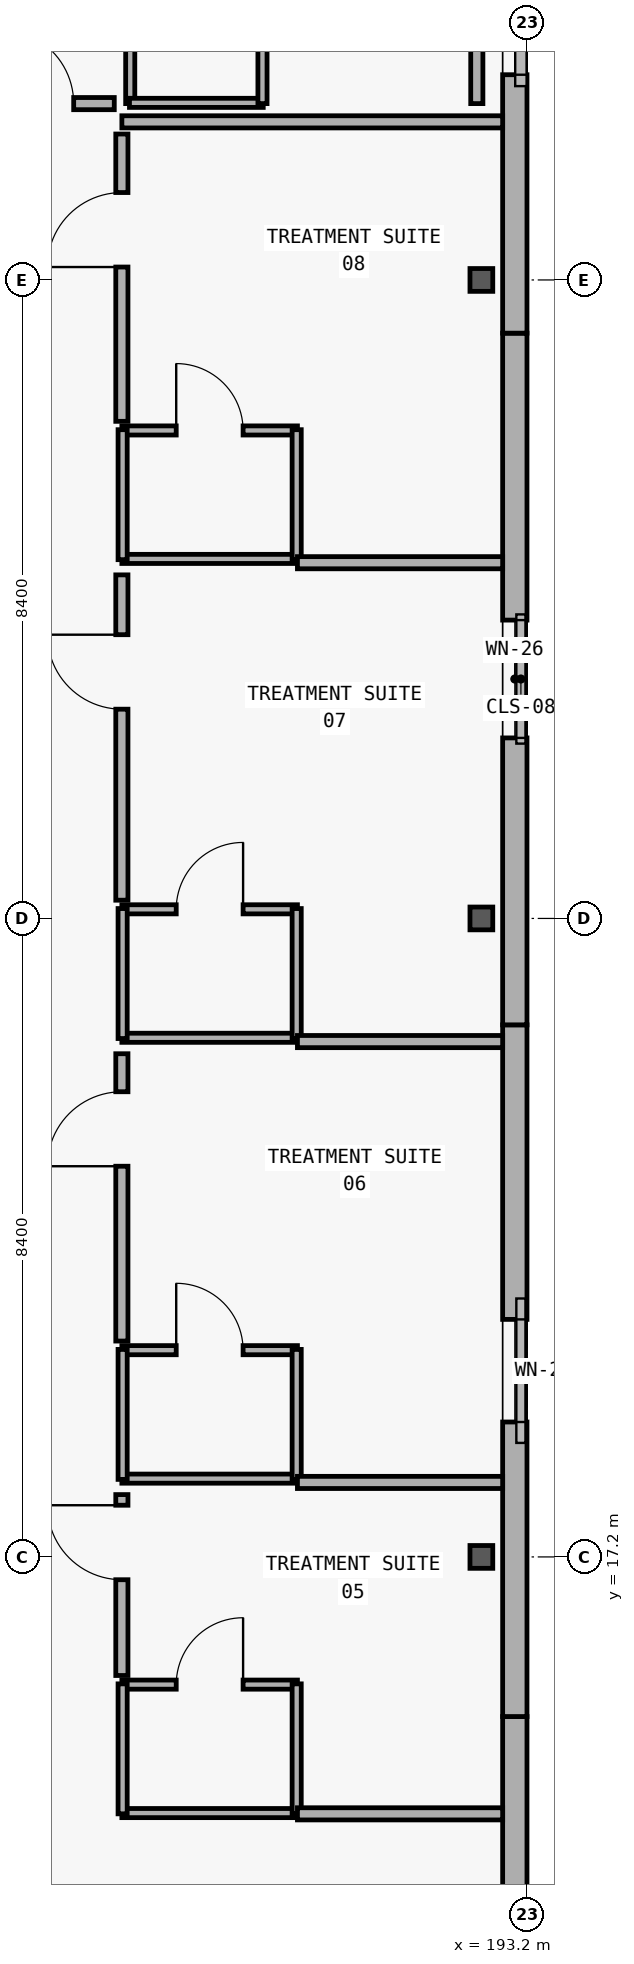
"""IFC4 building model, lengths in metres.
Left out: names, types, materials, properties, quantities, classifications, styles, units other than length and angle.
Written with IfcOpenShell. Run it as: python <this file> out.ifc"""

import sys

from ifc_helpers import new_model, si_unit, direction, frame, frame_2d, origin, origin_2d, place, context, subcontext, project, spatial, rectangle, i_section, extrude, element, fill, save


model = new_model("IFC4")
c1 = context("Model", 3, precision=1e-05, world=origin(), true_north=direction((0.0, 1.0)))
c2 = subcontext(c1, "Body", "Model", "MODEL_VIEW")
j1 = project(units=[si_unit("LENGTHUNIT", "METRE"), si_unit("PLANEANGLEUNIT", "RADIAN")], contexts=[c1])
p1 = place(None, origin())
s1 = spatial("IfcSite", under=j1, at=p1, CompositionType="ELEMENT")
p2 = place(p1, origin())
s2 = spatial("IfcBuilding", under=s1, at=p2, CompositionType="ELEMENT")
p3 = place(p2, frame((0.0, 0.0, 5.4)))
s3 = spatial("IfcBuildingStorey", under=s2, at=p3, CompositionType="ELEMENT", Elevation=5.4)
for number, where, z_axis, x_axis in (
    (1, (192.6, 17.2, 0.0), (0.0, 0.0, 1.0), (1.0, 0.0, 0.0)),
    (2, (192.6, 25.6, 0.0), (0.0, 0.0, 1.0), (1.0, 0.0, 0.0)),
    (3, (192.6, 34.0, 0.0), (0.0, 0.0, 1.0), (1.0, 0.0, 0.0)),
):
    element("IfcColumn", number, at=place(p3, frame(where, z_axis=z_axis, x_axis=x_axis)), inside=s3, PredefinedType="COLUMN", context=c2, shape_type="SweptSolid", body=[
        extrude(i_section(OverallWidth=0.3, OverallDepth=0.3, WebThickness=0.011, FlangeThickness=0.019, at=origin_2d()), origin(), (0.0, 0.0, 1.0), 5.4),
    ])
p4 = place(p3, frame((193.04, 15.1, 0.0), z_axis=(0.0, 0.0, 1.0), x_axis=(0.0, -1.0, 0.0)))
e4 = element("IfcWall", 4, at=p4, inside=s3, PredefinedType="SOLIDWALL", context=c2, shape_type="SweptSolid", body=[
    extrude(rectangle(XDim=9.1, YDim=0.32, at=frame_2d((4.55, 0.0))), origin(), (0.0, 0.0, 1.0), 5.1),
])
p5 = place(p4, frame((2.55, 0.0, 0.9)))
e5 = element("IfcOpeningElement", 5, at=p5, cuts=e4, PredefinedType="OPENING", context=c2, shape_type="SweptSolid", body=[
    extrude(rectangle(XDim=4.0, YDim=2.4, at=frame_2d((2.0, 1.2))), frame((0.0, 0.17, 0.0), z_axis=(0.0, -1.0, 0.0), x_axis=(1.0, 0.0, 0.0)), (0.0, 0.0, 1.0), 0.34),
])
p6 = place(p3, frame((193.04, 24.2, 0.0), z_axis=(0.0, 0.0, 1.0), x_axis=(0.0, -1.0, 0.0)))
e6 = element("IfcWall", 6, at=p6, inside=s3, PredefinedType="SOLIDWALL", context=c2, shape_type="SweptSolid", body=[
    extrude(rectangle(XDim=9.1, YDim=0.32, at=frame_2d((4.55, 0.0))), origin(), (0.0, 0.0, 1.0), 5.1),
])
p7 = place(p6, frame((3.875, 0.0, 0.9)))
e7 = element("IfcOpeningElement", 7, at=p7, cuts=e6, PredefinedType="OPENING", context=c2, shape_type="SweptSolid", body=[
    extrude(rectangle(XDim=1.35, YDim=1.55, at=frame_2d((0.675, 0.775))), frame((0.0, 0.17, 0.0), z_axis=(0.0, -1.0, 0.0), x_axis=(1.0, 0.0, 0.0)), (0.0, 0.0, 1.0), 0.34),
])
p8 = place(p3, frame((193.04, 33.3, 0.0), z_axis=(0.0, 0.0, 1.0), x_axis=(0.0, -1.0, 0.0)))
e8 = element("IfcWall", 8, at=p8, inside=s3, PredefinedType="SOLIDWALL", context=c2, shape_type="SweptSolid", body=[
    extrude(rectangle(XDim=9.1, YDim=0.32, at=frame_2d((4.55, 0.0))), origin(), (0.0, 0.0, 1.0), 5.1),
])
p9 = place(p8, frame((3.775, 0.0, 0.9)))
e9 = element("IfcOpeningElement", 9, at=p9, cuts=e8, PredefinedType="OPENING", context=c2, shape_type="SweptSolid", body=[
    extrude(rectangle(XDim=1.55, YDim=1.65, at=frame_2d((0.775, 0.825))), frame((0.0, 0.17, 0.0), z_axis=(0.0, -1.0, 0.0), x_axis=(1.0, 0.0, 0.0)), (0.0, 0.0, 1.0), 0.34),
])
p10 = place(p3, frame((193.04, 42.4, 0.0), z_axis=(0.0, 0.0, 1.0), x_axis=(0.0, -1.0, 0.0)))
e10 = element("IfcWall", 10, at=p10, inside=s3, PredefinedType="SOLIDWALL", context=c2, shape_type="SweptSolid", body=[
    extrude(rectangle(XDim=9.1, YDim=0.32, at=frame_2d((4.55, 0.0))), origin(), (0.0, 0.0, 1.0), 5.1),
])
p11 = place(p10, frame((3.4, 0.0, 0.9)))
e11 = element("IfcOpeningElement", 11, at=p11, cuts=e10, PredefinedType="OPENING", context=c2, shape_type="SweptSolid", body=[
    extrude(rectangle(XDim=2.3, YDim=2.05, at=frame_2d((1.15, 1.025))), frame((0.0, 0.17, 0.0), z_axis=(0.0, -1.0, 0.0), x_axis=(1.0, 0.0, 0.0)), (0.0, 0.0, 1.0), 0.34),
])
p12 = place(p3, frame((187.87, 15.52, 0.0), z_axis=(0.0, 0.0, 1.0), x_axis=(1.0, 0.0, 0.0)))
e12 = element("IfcWall", 12, at=p12, inside=s3, PredefinedType="PARTITIONING", context=c2, shape_type="SweptSolid", body=[
    extrude(rectangle(XDim=2.31, YDim=0.12, at=frame_2d((1.155, 0.0))), origin(), (0.0, 0.0, 1.0), 4.18),
])
p13 = place(p12, frame((0.715, 0.0, 0.0)))
e13 = element("IfcOpeningElement", 13, at=p13, cuts=e12, PredefinedType="OPENING", context=c2, shape_type="SweptSolid", body=[
    extrude(rectangle(XDim=0.88, YDim=2.15, at=frame_2d((0.44, 1.075))), frame((0.0, 0.07, 0.0), z_axis=(0.0, -1.0, 0.0), x_axis=(1.0, 0.0, 0.0)), (0.0, 0.0, 1.0), 0.14),
])
p14 = place(p3, frame((187.87, 19.92, 0.0), z_axis=(0.0, 0.0, 1.0), x_axis=(1.0, 0.0, 0.0)))
e14 = element("IfcWall", 14, at=p14, inside=s3, PredefinedType="PARTITIONING", context=c2, shape_type="SweptSolid", body=[
    extrude(rectangle(XDim=2.31, YDim=0.12, at=frame_2d((1.155, 0.0))), origin(), (0.0, 0.0, 1.0), 4.18),
])
p15 = place(p14, frame((0.715, 0.0, 0.0)))
e15 = element("IfcOpeningElement", 15, at=p15, cuts=e14, PredefinedType="OPENING", context=c2, shape_type="SweptSolid", body=[
    extrude(rectangle(XDim=0.88, YDim=2.15, at=frame_2d((0.44, 1.075))), frame((0.0, 0.07, 0.0), z_axis=(0.0, -1.0, 0.0), x_axis=(1.0, 0.0, 0.0)), (0.0, 0.0, 1.0), 0.14),
])
p16 = place(p3, frame((187.87, 25.72, 0.0), z_axis=(0.0, 0.0, 1.0), x_axis=(1.0, 0.0, 0.0)))
e16 = element("IfcWall", 16, at=p16, inside=s3, PredefinedType="PARTITIONING", context=c2, shape_type="SweptSolid", body=[
    extrude(rectangle(XDim=2.31, YDim=0.12, at=frame_2d((1.155, 0.0))), origin(), (0.0, 0.0, 1.0), 4.18),
])
p17 = place(p16, frame((0.715, 0.0, 0.0)))
e17 = element("IfcOpeningElement", 17, at=p17, cuts=e16, PredefinedType="OPENING", context=c2, shape_type="SweptSolid", body=[
    extrude(rectangle(XDim=0.88, YDim=2.15, at=frame_2d((0.44, 1.075))), frame((0.0, 0.07, 0.0), z_axis=(0.0, -1.0, 0.0), x_axis=(1.0, 0.0, 0.0)), (0.0, 0.0, 1.0), 0.14),
])
p18 = place(p3, frame((187.87, 32.02, 0.0), z_axis=(0.0, 0.0, 1.0), x_axis=(1.0, 0.0, 0.0)))
e18 = element("IfcWall", 18, at=p18, inside=s3, PredefinedType="PARTITIONING", context=c2, shape_type="SweptSolid", body=[
    extrude(rectangle(XDim=2.31, YDim=0.12, at=frame_2d((1.155, 0.0))), origin(), (0.0, 0.0, 1.0), 4.18),
])
p19 = place(p18, frame((0.715, 0.0, 0.0)))
e19 = element("IfcOpeningElement", 19, at=p19, cuts=e18, PredefinedType="OPENING", context=c2, shape_type="SweptSolid", body=[
    extrude(rectangle(XDim=0.88, YDim=2.15, at=frame_2d((0.44, 1.075))), frame((0.0, 0.07, 0.0), z_axis=(0.0, -1.0, 0.0), x_axis=(1.0, 0.0, 0.0)), (0.0, 0.0, 1.0), 0.14),
])
p20 = place(p3, frame((187.98, 36.32, 0.0), z_axis=(0.0, 0.0, 1.0), x_axis=(0.0, 1.0, 0.0)))
e20 = element("IfcWall", 20, at=p20, inside=s3, PredefinedType="PARTITIONING", context=c2, shape_type="SweptSolid", body=[
    extrude(rectangle(XDim=2.31, YDim=0.12, at=frame_2d((1.155, 0.0))), origin(), (0.0, 0.0, 1.0), 4.18),
])
p21 = place(p20, frame((0.715, 0.0, 0.0)))
e21 = element("IfcOpeningElement", 21, at=p21, cuts=e20, PredefinedType="OPENING", context=c2, shape_type="SweptSolid", body=[
    extrude(rectangle(XDim=0.88, YDim=2.15, at=frame_2d((0.44, 1.075))), frame((0.0, 0.07, 0.0), z_axis=(0.0, -1.0, 0.0), x_axis=(1.0, 0.0, 0.0)), (0.0, 0.0, 1.0), 0.14),
])
p22 = place(p3, frame((187.87, 15.64, 0.0), z_axis=(0.0, 0.0, 1.0), x_axis=(0.0, 1.0, 0.0)))
e22 = element("IfcWall", 22, at=p22, inside=s3, PredefinedType="PARTITIONING", context=c2, shape_type="SweptSolid", body=[
    extrude(rectangle(XDim=2.38, YDim=0.16, at=frame_2d((1.19, 0.0))), origin(), (0.0, 0.0, 1.0), 4.18),
])
p23 = place(p22, frame((1.26, 0.0, 0.0)))
e23 = element("IfcOpeningElement", 23, at=p23, cuts=e22, PredefinedType="OPENING", context=c2, shape_type="SweptSolid", body=[
    extrude(rectangle(XDim=0.98, YDim=2.2, at=frame_2d((0.49, 1.1))), frame((0.0, 0.09, 0.0), z_axis=(0.0, -1.0, 0.0), x_axis=(1.0, 0.0, 0.0)), (0.0, 0.0, 1.0), 0.18),
])
p24 = place(p3, frame((187.87, 20.04, 0.0), z_axis=(0.0, 0.0, 1.0), x_axis=(0.0, 1.0, 0.0)))
e24 = element("IfcWall", 24, at=p24, inside=s3, PredefinedType="PARTITIONING", context=c2, shape_type="SweptSolid", body=[
    extrude(rectangle(XDim=3.78, YDim=0.16, at=frame_2d((1.89, 0.0))), origin(), (0.0, 0.0, 1.0), 4.18),
])
p25 = place(p24, frame((2.3, 0.0, 0.0)))
e25 = element("IfcOpeningElement", 25, at=p25, cuts=e24, PredefinedType="OPENING", context=c2, shape_type="SweptSolid", body=[
    extrude(rectangle(XDim=0.98, YDim=2.2, at=frame_2d((0.49, 1.1))), frame((0.0, 0.09, 0.0), z_axis=(0.0, -1.0, 0.0), x_axis=(1.0, 0.0, 0.0)), (0.0, 0.0, 1.0), 0.18),
])
p26 = place(p3, frame((187.87, 25.84, 0.0), z_axis=(0.0, 0.0, 1.0), x_axis=(0.0, 1.0, 0.0)))
e26 = element("IfcWall", 26, at=p26, inside=s3, PredefinedType="PARTITIONING", context=c2, shape_type="SweptSolid", body=[
    extrude(rectangle(XDim=4.28, YDim=0.16, at=frame_2d((2.14, 0.0))), origin(), (0.0, 0.0, 1.0), 4.18),
])
p27 = place(p26, frame((2.513, 0.0, 0.0)))
e27 = element("IfcOpeningElement", 27, at=p27, cuts=e26, PredefinedType="OPENING", context=c2, shape_type="SweptSolid", body=[
    extrude(rectangle(XDim=0.98, YDim=2.2, at=frame_2d((0.49, 1.1))), frame((0.0, 0.09, 0.0), z_axis=(0.0, -1.0, 0.0), x_axis=(1.0, 0.0, 0.0)), (0.0, 0.0, 1.0), 0.18),
])
p28 = place(p3, frame((187.87, 32.14, 0.0), z_axis=(0.0, 0.0, 1.0), x_axis=(0.0, 1.0, 0.0)))
e28 = element("IfcWall", 28, at=p28, inside=s3, PredefinedType="PARTITIONING", context=c2, shape_type="SweptSolid", body=[
    extrude(rectangle(XDim=3.78, YDim=0.16, at=frame_2d((1.89, 0.0))), origin(), (0.0, 0.0, 1.0), 4.18),
])
p29 = place(p28, frame((2.03, 0.0, 0.0)))
e29 = element("IfcOpeningElement", 29, at=p29, cuts=e28, PredefinedType="OPENING", context=c2, shape_type="SweptSolid", body=[
    extrude(rectangle(XDim=0.98, YDim=2.2, at=frame_2d((0.49, 1.1))), frame((0.0, 0.09, 0.0), z_axis=(0.0, -1.0, 0.0), x_axis=(1.0, 0.0, 0.0)), (0.0, 0.0, 1.0), 0.18),
])
p30 = place(p3, frame((185.93, 36.32, 0.0), z_axis=(0.0, 0.0, 1.0), x_axis=(1.0, 0.0, 0.0)))
e30 = element("IfcWall", 30, at=p30, inside=s3, PredefinedType="PARTITIONING", context=c2, shape_type="SweptSolid", body=[
    extrude(rectangle(XDim=1.84, YDim=0.16, at=frame_2d((0.92, 0.0))), origin(), (0.0, 0.0, 1.0), 4.18),
])
p31 = place(p30, frame((0.326, 0.0, 0.0)))
e31 = element("IfcOpeningElement", 31, at=p31, cuts=e30, PredefinedType="OPENING", context=c2, shape_type="SweptSolid", body=[
    extrude(rectangle(XDim=0.98, YDim=2.2, at=frame_2d((0.49, 1.1))), frame((0.0, 0.09, 0.0), z_axis=(0.0, -1.0, 0.0), x_axis=(1.0, 0.0, 0.0)), (0.0, 0.0, 1.0), 0.18),
])
p32 = place(p3, frame((187.87, 13.83, 0.0), z_axis=(0.0, 0.0, 1.0), x_axis=(1.0, 0.0, 0.0)))
e32 = element("IfcWall", 32, at=p32, inside=s3, PredefinedType="PARTITIONING", context=c2, shape_type="SweptSolid", body=[
    extrude(rectangle(XDim=2.31, YDim=0.12, at=frame_2d((1.155, 0.0))), origin(), (0.0, 0.0, 1.0), 4.18),
])
for number, where, z_axis, x_axis in (
    (33, (187.88, 13.82, 0.0), (0.0, 0.0, 1.0), (0.0, 1.0, 0.0)),
    (34, (190.17, 13.82, 0.0), (0.0, 0.0, 1.0), (0.0, 1.0, 0.0)),
):
    element("IfcWall", number, at=place(p3, frame(where, z_axis=z_axis, x_axis=x_axis)), inside=s3, PredefinedType="PARTITIONING", context=c2, shape_type="SweptSolid", body=[
        extrude(rectangle(XDim=1.71, YDim=0.12, at=frame_2d((0.855, 0.0))), origin(), (0.0, 0.0, 1.0), 4.18),
    ])
p33 = place(p3, frame((187.87, 18.23, 0.0), z_axis=(0.0, 0.0, 1.0), x_axis=(1.0, 0.0, 0.0)))
e35 = element("IfcWall", 35, at=p33, inside=s3, PredefinedType="PARTITIONING", context=c2, shape_type="SweptSolid", body=[
    extrude(rectangle(XDim=2.31, YDim=0.12, at=frame_2d((1.155, 0.0))), origin(), (0.0, 0.0, 1.0), 4.18),
])
for number, where, z_axis, x_axis in (
    (36, (187.88, 18.22, 0.0), (0.0, 0.0, 1.0), (0.0, 1.0, 0.0)),
    (37, (190.17, 18.22, 0.0), (0.0, 0.0, 1.0), (0.0, 1.0, 0.0)),
):
    element("IfcWall", number, at=place(p3, frame(where, z_axis=z_axis, x_axis=x_axis)), inside=s3, PredefinedType="PARTITIONING", context=c2, shape_type="SweptSolid", body=[
        extrude(rectangle(XDim=1.71, YDim=0.12, at=frame_2d((0.855, 0.0))), origin(), (0.0, 0.0, 1.0), 4.18),
    ])
p34 = place(p3, frame((187.87, 24.03, 0.0), z_axis=(0.0, 0.0, 1.0), x_axis=(1.0, 0.0, 0.0)))
e38 = element("IfcWall", 38, at=p34, inside=s3, PredefinedType="PARTITIONING", context=c2, shape_type="SweptSolid", body=[
    extrude(rectangle(XDim=2.31, YDim=0.12, at=frame_2d((1.155, 0.0))), origin(), (0.0, 0.0, 1.0), 4.18),
])
for number, where, z_axis, x_axis in (
    (39, (187.88, 24.02, 0.0), (0.0, 0.0, 1.0), (0.0, 1.0, 0.0)),
    (40, (190.17, 24.02, 0.0), (0.0, 0.0, 1.0), (0.0, 1.0, 0.0)),
):
    element("IfcWall", number, at=place(p3, frame(where, z_axis=z_axis, x_axis=x_axis)), inside=s3, PredefinedType="PARTITIONING", context=c2, shape_type="SweptSolid", body=[
        extrude(rectangle(XDim=1.71, YDim=0.12, at=frame_2d((0.855, 0.0))), origin(), (0.0, 0.0, 1.0), 4.18),
    ])
p35 = place(p3, frame((187.87, 30.33, 0.0), z_axis=(0.0, 0.0, 1.0), x_axis=(1.0, 0.0, 0.0)))
e41 = element("IfcWall", 41, at=p35, inside=s3, PredefinedType="PARTITIONING", context=c2, shape_type="SweptSolid", body=[
    extrude(rectangle(XDim=2.31, YDim=0.12, at=frame_2d((1.155, 0.0))), origin(), (0.0, 0.0, 1.0), 4.18),
])
for number, where, z_axis, x_axis in (
    (42, (187.88, 30.32, 0.0), (0.0, 0.0, 1.0), (0.0, 1.0, 0.0)),
    (43, (190.17, 30.32, 0.0), (0.0, 0.0, 1.0), (0.0, 1.0, 0.0)),
):
    element("IfcWall", number, at=place(p3, frame(where, z_axis=z_axis, x_axis=x_axis)), inside=s3, PredefinedType="PARTITIONING", context=c2, shape_type="SweptSolid", body=[
        extrude(rectangle(XDim=1.71, YDim=0.12, at=frame_2d((0.855, 0.0))), origin(), (0.0, 0.0, 1.0), 4.18),
    ])
p36 = place(p3, frame((187.97, 36.33, 0.0), z_axis=(0.0, 0.0, 1.0), x_axis=(1.0, 0.0, 0.0)))
e44 = element("IfcWall", 44, at=p36, inside=s3, PredefinedType="PARTITIONING", context=c2, shape_type="SweptSolid", body=[
    extrude(rectangle(XDim=1.76, YDim=0.12, at=frame_2d((0.88, 0.0))), origin(), (0.0, 0.0, 1.0), 4.18),
])
p37 = place(p3, frame((189.72, 36.32, 0.0), z_axis=(0.0, 0.0, 1.0), x_axis=(0.0, 1.0, 0.0)))
e45 = element("IfcWall", 45, at=p37, inside=s3, PredefinedType="PARTITIONING", context=c2, shape_type="SweptSolid", body=[
    extrude(rectangle(XDim=2.31, YDim=0.12, at=frame_2d((1.155, 0.0))), origin(), (0.0, 0.0, 1.0), 4.18),
])
for number, where, z_axis, x_axis in (
    (46, (190.18, 13.82, 0.0), (0.0, 0.0, 1.0), (1.0, 0.0, 0.0)),
    (47, (190.18, 18.18, 0.0), (0.0, 0.0, 1.0), (1.0, 0.0, 0.0)),
    (48, (190.18, 23.98, 0.0), (0.0, 0.0, 1.0), (1.0, 0.0, 0.0)),
    (49, (190.18, 30.28, 0.0), (0.0, 0.0, 1.0), (1.0, 0.0, 0.0)),
):
    element("IfcWall", number, at=place(p3, frame(where, z_axis=z_axis, x_axis=x_axis)), inside=s3, PredefinedType="PARTITIONING", context=c2, shape_type="SweptSolid", body=[
        extrude(rectangle(XDim=2.7, YDim=0.16, at=frame_2d((1.35, 0.0))), origin(), (0.0, 0.0, 1.0), 4.18),
    ])
p38 = place(p3, frame((187.87, 36.08, 0.0), z_axis=(0.0, 0.0, 1.0), x_axis=(1.0, 0.0, 0.0)))
e50 = element("IfcWall", 50, at=p38, inside=s3, PredefinedType="PARTITIONING", context=c2, shape_type="SweptSolid", body=[
    extrude(rectangle(XDim=5.01, YDim=0.16, at=frame_2d((2.505, 0.0))), origin(), (0.0, 0.0, 1.0), 4.18),
])
p39 = place(p3, frame((192.54, 36.32, 0.0), z_axis=(0.0, 0.0, 1.0), x_axis=(0.0, 1.0, 0.0)))
e51 = element("IfcWall", 51, at=p39, inside=s3, PredefinedType="PARTITIONING", context=c2, shape_type="SweptSolid", body=[
    extrude(rectangle(XDim=5.76, YDim=0.16, at=frame_2d((2.88, 0.0))), origin(), (0.0, 0.0, 1.0), 4.18),
])
p40 = place(p7, origin())
e52 = element("IfcWindow", 52, at=p40, inside=s3, PartitioningType="SINGLE_PANEL", PredefinedType="WINDOW", context=c2, shape_type="SweptSolid", body=[
    extrude(rectangle(XDim=1.35, YDim=1.55, at=frame_2d((0.675, 0.775))), frame((0.0, 0.03, 0.0), z_axis=(0.0, -1.0, 0.0), x_axis=(1.0, 0.0, 0.0)), (0.0, 0.0, 1.0), 0.06),
])
fill(e7, e52)
p41 = place(p9, origin())
e53 = element("IfcWindow", 53, at=p41, inside=s3, PartitioningType="SINGLE_PANEL", PredefinedType="WINDOW", context=c2, shape_type="SweptSolid", body=[
    extrude(rectangle(XDim=1.55, YDim=1.65, at=frame_2d((0.775, 0.825))), frame((0.0, 0.03, 0.0), z_axis=(0.0, -1.0, 0.0), x_axis=(1.0, 0.0, 0.0)), (0.0, 0.0, 1.0), 0.06),
])
fill(e9, e53)
p42 = place(p11, origin())
e54 = element("IfcWindow", 54, at=p42, inside=s3, PartitioningType="SINGLE_PANEL", PredefinedType="WINDOW", context=c2, shape_type="SweptSolid", body=[
    extrude(rectangle(XDim=2.3, YDim=2.05, at=frame_2d((1.15, 1.025))), frame((0.0, 0.03, 0.0), z_axis=(0.0, -1.0, 0.0), x_axis=(1.0, 0.0, 0.0)), (0.0, 0.0, 1.0), 0.06),
])
fill(e11, e54)
p43 = place(p13, origin())
e55 = element("IfcDoor", 55, at=p43, inside=s3, OperationType="SINGLE_SWING_RIGHT", PredefinedType="DOOR", context=c2, shape_type="SweptSolid", body=[
    extrude(rectangle(XDim=0.88, YDim=2.15, at=frame_2d((0.44, 1.075))), frame((0.0, 0.025, 0.0), z_axis=(0.0, -1.0, 0.0), x_axis=(1.0, 0.0, 0.0)), (0.0, 0.0, 1.0), 0.05),
])
fill(e13, e55)
p44 = place(p15, origin())
e56 = element("IfcDoor", 56, at=p44, inside=s3, OperationType="SINGLE_SWING_LEFT", PredefinedType="DOOR", context=c2, shape_type="SweptSolid", body=[
    extrude(rectangle(XDim=0.88, YDim=2.15, at=frame_2d((0.44, 1.075))), frame((0.0, 0.025, 0.0), z_axis=(0.0, -1.0, 0.0), x_axis=(1.0, 0.0, 0.0)), (0.0, 0.0, 1.0), 0.05),
])
fill(e15, e56)
p45 = place(p17, origin())
e57 = element("IfcDoor", 57, at=p45, inside=s3, OperationType="SINGLE_SWING_RIGHT", PredefinedType="DOOR", context=c2, shape_type="SweptSolid", body=[
    extrude(rectangle(XDim=0.88, YDim=2.15, at=frame_2d((0.44, 1.075))), frame((0.0, 0.025, 0.0), z_axis=(0.0, -1.0, 0.0), x_axis=(1.0, 0.0, 0.0)), (0.0, 0.0, 1.0), 0.05),
])
fill(e17, e57)
p46 = place(p19, origin())
e58 = element("IfcDoor", 58, at=p46, inside=s3, OperationType="SINGLE_SWING_LEFT", PredefinedType="DOOR", context=c2, shape_type="SweptSolid", body=[
    extrude(rectangle(XDim=0.88, YDim=2.15, at=frame_2d((0.44, 1.075))), frame((0.0, 0.025, 0.0), z_axis=(0.0, -1.0, 0.0), x_axis=(1.0, 0.0, 0.0)), (0.0, 0.0, 1.0), 0.05),
])
fill(e19, e58)
p47 = place(p23, origin())
e59 = element("IfcDoor", 59, at=p47, inside=s3, OperationType="SINGLE_SWING_RIGHT", PredefinedType="DOOR", context=c2, shape_type="SweptSolid", body=[
    extrude(rectangle(XDim=0.98, YDim=2.2, at=frame_2d((0.49, 1.1))), frame((0.0, 0.025, 0.0), z_axis=(0.0, -1.0, 0.0), x_axis=(1.0, 0.0, 0.0)), (0.0, 0.0, 1.0), 0.05),
])
fill(e23, e59)
p48 = place(p25, origin())
e60 = element("IfcDoor", 60, at=p48, inside=s3, OperationType="SINGLE_SWING_LEFT", PredefinedType="DOOR", context=c2, shape_type="SweptSolid", body=[
    extrude(rectangle(XDim=0.98, YDim=2.2, at=frame_2d((0.49, 1.1))), frame((0.0, 0.025, 0.0), z_axis=(0.0, -1.0, 0.0), x_axis=(1.0, 0.0, 0.0)), (0.0, 0.0, 1.0), 0.05),
])
fill(e25, e60)
p49 = place(p27, origin())
e61 = element("IfcDoor", 61, at=p49, inside=s3, OperationType="SINGLE_SWING_RIGHT", PredefinedType="DOOR", context=c2, shape_type="SweptSolid", body=[
    extrude(rectangle(XDim=0.98, YDim=2.2, at=frame_2d((0.49, 1.1))), frame((0.0, 0.025, 0.0), z_axis=(0.0, -1.0, 0.0), x_axis=(1.0, 0.0, 0.0)), (0.0, 0.0, 1.0), 0.05),
])
fill(e27, e61)
p50 = place(p29, origin())
e62 = element("IfcDoor", 62, at=p50, inside=s3, OperationType="SINGLE_SWING_LEFT", PredefinedType="DOOR", context=c2, shape_type="SweptSolid", body=[
    extrude(rectangle(XDim=0.98, YDim=2.2, at=frame_2d((0.49, 1.1))), frame((0.0, 0.025, 0.0), z_axis=(0.0, -1.0, 0.0), x_axis=(1.0, 0.0, 0.0)), (0.0, 0.0, 1.0), 0.05),
])
fill(e29, e62)
p51 = place(p31, origin())
e63 = element("IfcDoor", 63, at=p51, inside=s3, OperationType="SINGLE_SWING_LEFT", PredefinedType="DOOR", context=c2, shape_type="SweptSolid", body=[
    extrude(rectangle(XDim=0.98, YDim=2.2, at=frame_2d((0.49, 1.1))), frame((0.0, 0.025, 0.0), z_axis=(0.0, -1.0, 0.0), x_axis=(1.0, 0.0, 0.0)), (0.0, 0.0, 1.0), 0.05),
])
fill(e31, e63)
save(model, sys.argv[1])
